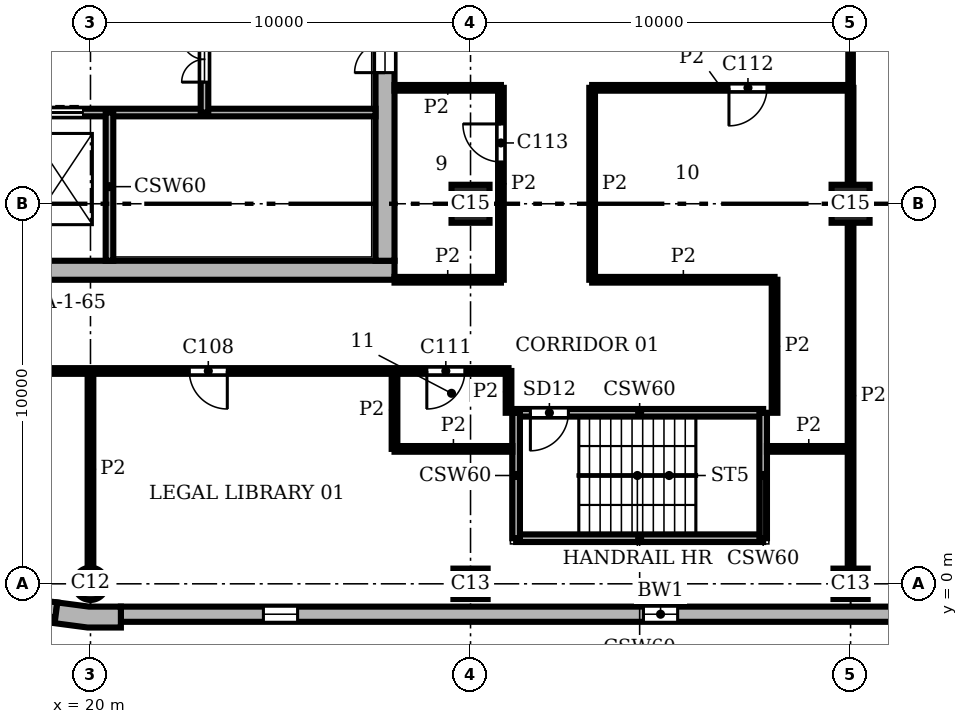
"""IFC4 building model, lengths in metres.
Left out: names, types, materials, properties, quantities, classifications, styles, units other than length and angle.
Written with IfcOpenShell. Run it as: python <this file> out.ifc"""

import sys

from ifc_helpers import new_model, si_unit, direction, frame, frame_2d, origin, origin_2d, place, context, subcontext, project, spatial, polyline, rectangle, circle, outline, extrude, element, fill, save


model = new_model("IFC4")
c1 = context("Model", 3, precision=1e-05, world=origin(), true_north=direction((0.0, 1.0)))
c2 = subcontext(c1, "Body", "Model", "MODEL_VIEW")
j1 = project(units=[si_unit("LENGTHUNIT", "METRE"), si_unit("PLANEANGLEUNIT", "RADIAN")], contexts=[c1])
p1 = place(None, origin())
s1 = spatial("IfcSite", under=j1, at=p1, CompositionType="ELEMENT")
p2 = place(p1, origin())
s2 = spatial("IfcBuilding", under=s1, at=p2, CompositionType="ELEMENT")
p3 = place(p2, frame((0.0, 0.0, 251.4)))
s3 = spatial("IfcBuildingStorey", under=s2, at=p3, CompositionType="ELEMENT", Elevation=251.4)
p4 = place(p3, frame((20.0, 0.0, 0.0), z_axis=(0.0, 0.0, 1.0), x_axis=(1.0, 0.0, 0.0)))
e1 = element("IfcColumn", 1, at=p4, inside=s3, PredefinedType="COLUMN", context=c2, shape_type="SweptSolid", body=[
    extrude(circle(Radius=0.425, at=origin_2d()), origin(), (0.0, 0.0, 1.0), 3.9),
])
for number, where, z_axis, x_axis in (
    (2, (30.0, 0.0, 0.0), (0.0, 0.0, 1.0), (1.0, 0.0, 0.0)),
    (3, (40.0, 0.0, 0.0), (0.0, 0.0, 1.0), (1.0, 0.0, 0.0)),
):
    element("IfcColumn", number, at=place(p3, frame(where, z_axis=z_axis, x_axis=x_axis)), inside=s3, PredefinedType="COLUMN", context=c2, shape_type="SweptSolid", body=[
        extrude(rectangle(XDim=0.9, YDim=0.8, at=origin_2d()), origin(), (0.0, 0.0, 1.0), 3.9),
    ])
for number, where, z_axis, x_axis in (
    (4, (30.0, 10.0, 0.0), (0.0, 0.0, 1.0), (1.0, 0.0, 0.0)),
    (5, (40.0, 10.0, 0.0), (0.0, 0.0, 1.0), (1.0, 0.0, 0.0)),
):
    element("IfcColumn", number, at=place(p3, frame(where, z_axis=z_axis, x_axis=x_axis)), inside=s3, PredefinedType="COLUMN", context=c2, shape_type="SweptSolid", body=[
        extrude(rectangle(XDim=1.0, YDim=1.0, at=origin_2d()), origin(), (0.0, 0.0, 1.0), 3.9),
    ])
p5 = place(p3, frame((8.0, 8.25, 0.0), z_axis=(0.0, 0.0, 1.0), x_axis=(1.0, 0.0, 0.0)))
e6 = element("IfcWall", 6, at=p5, inside=s3, PredefinedType="SHEAR", context=c2, shape_type="SweptSolid", body=[
    extrude(rectangle(XDim=20.0, YDim=0.5, at=frame_2d((10.0, 0.0))), origin(), (0.0, 0.0, 1.0), 3.9),
])
p6 = place(p3, frame((27.75, 8.5, 0.0), z_axis=(0.0, 0.0, 1.0), x_axis=(0.0, 1.0, 0.0)))
e7 = element("IfcWall", 7, at=p6, inside=s3, PredefinedType="SHEAR", context=c2, shape_type="SweptSolid", body=[
    extrude(rectangle(XDim=19.0, YDim=0.5, at=frame_2d((9.5, 0.0))), origin(), (0.0, 0.0, 1.0), 3.9),
])
p7 = place(p6, frame((4.95, 0.0, 0.0)))
e8 = element("IfcOpeningElement", 8, at=p7, cuts=e7, PredefinedType="OPENING", context=c2, shape_type="SweptSolid", body=[
    extrude(rectangle(XDim=1.6, YDim=2.1, at=frame_2d((0.8, 1.05))), frame((0.0, 0.26, 0.0), z_axis=(0.0, -1.0, 0.0), x_axis=(1.0, 0.0, 0.0)), (0.0, 0.0, 1.0), 0.52),
])
p8 = place(p3, origin())
e9 = element("IfcWall", 9, at=p8, inside=s3, PredefinedType="SOLIDWALL", context=c2, shape_type="SweptSolid", body=[
    extrude(outline(polyline([(19.076, -0.887), (19.057, -1.036), (19.925, -1.15), (20.8, -1.15), (20.8, -1.0), (20.8, -0.6), (19.961, -0.6), (19.128, -0.49), (19.076, -0.887)])), origin(), (0.0, 0.0, 1.0), 3.9),
])
p9 = place(p3, frame((20.8, -0.8, 0.0), z_axis=(0.0, 0.0, 1.0), x_axis=(1.0, 0.0, 0.0)))
e10 = element("IfcWall", 10, at=p9, inside=s3, PredefinedType="SOLIDWALL", context=c2, shape_type="SweptSolid", body=[
    extrude(rectangle(XDim=28.4, YDim=0.4, at=frame_2d((14.2, 0.0))), origin(), (0.0, 0.0, 1.0), 3.9),
])
p10 = place(p9, frame((3.75, 0.0, 0.9)))
e11 = element("IfcOpeningElement", 11, at=p10, cuts=e10, PredefinedType="OPENING", context=c2, shape_type="SweptSolid", body=[
    extrude(rectangle(XDim=0.9, YDim=2.35, at=frame_2d((0.45, 1.175))), frame((0.0, 0.21, 0.0), z_axis=(0.0, -1.0, 0.0), x_axis=(1.0, 0.0, 0.0)), (0.0, 0.0, 1.0), 0.42),
])
p11 = place(p9, frame((13.75, 0.0, 0.9)))
e12 = element("IfcOpeningElement", 12, at=p11, cuts=e10, PredefinedType="OPENING", context=c2, shape_type="SweptSolid", body=[
    extrude(rectangle(XDim=0.9, YDim=2.35, at=frame_2d((0.45, 1.175))), frame((0.0, 0.21, 0.0), z_axis=(0.0, -1.0, 0.0), x_axis=(1.0, 0.0, 0.0)), (0.0, 0.0, 1.0), 0.42),
])
p12 = place(p9, frame((23.75, 0.0, 0.9)))
e13 = element("IfcOpeningElement", 13, at=p12, cuts=e10, PredefinedType="OPENING", context=c2, shape_type="SweptSolid", body=[
    extrude(rectangle(XDim=0.9, YDim=2.35, at=frame_2d((0.45, 1.175))), frame((0.0, 0.21, 0.0), z_axis=(0.0, -1.0, 0.0), x_axis=(1.0, 0.0, 0.0)), (0.0, 0.0, 1.0), 0.42),
])
p13 = place(p3, frame((15.017, -0.151, 0.0), z_axis=(0.0, 0.0, 1.0), x_axis=(0.991446429508, -0.130514280502, 0.0)))
e14 = element("IfcWall", 14, at=p13, inside=s3, PredefinedType="SOLIDWALL", context=c2, shape_type="SweptSolid", body=[
    extrude(rectangle(XDim=4.121, YDim=0.4, at=frame_2d((2.061, 0.0))), origin(), (0.0, 0.0, 1.0), 3.9),
])
p14 = place(p13, frame((1.611, 0.0, 0.9)))
e15 = element("IfcOpeningElement", 15, at=p14, cuts=e14, PredefinedType="OPENING", context=c2, shape_type="SweptSolid", body=[
    extrude(rectangle(XDim=0.9, YDim=2.35, at=frame_2d((0.45, 1.175))), frame((0.0, 0.21, 0.0), z_axis=(0.0, -1.0, 0.0), x_axis=(1.0, 0.0, 0.0)), (0.0, 0.0, 1.0), 0.42),
])
p15 = place(p3, frame((31.2, 1.2, 0.0), z_axis=(0.0, 0.0, 1.0), x_axis=(1.0, 0.0, 0.0)))
e16 = element("IfcWall", 16, at=p15, inside=s3, PredefinedType="SHEAR", context=c2, shape_type="SweptSolid", body=[
    extrude(rectangle(XDim=6.5, YDim=0.2, at=frame_2d((3.25, 0.0))), origin(), (0.0, 0.0, 1.0), 3.58),
])
p16 = place(p3, frame((31.2, 4.5, 0.0), z_axis=(0.0, 0.0, 1.0), x_axis=(1.0, 0.0, 0.0)))
e17 = element("IfcWall", 17, at=p16, inside=s3, PredefinedType="SHEAR", context=c2, shape_type="SweptSolid", body=[
    extrude(rectangle(XDim=6.5, YDim=0.2, at=frame_2d((3.25, 0.0))), origin(), (0.0, 0.0, 1.0), 3.58),
])
p17 = place(p16, frame((0.375, 0.0, 0.0)))
e18 = element("IfcOpeningElement", 18, at=p17, cuts=e17, PredefinedType="OPENING", context=c2, shape_type="SweptSolid", body=[
    extrude(rectangle(XDim=1.0, YDim=2.1, at=frame_2d((0.5, 1.05))), frame((0.0, 0.11, 0.0), z_axis=(0.0, -1.0, 0.0), x_axis=(1.0, 0.0, 0.0)), (0.0, 0.0, 1.0), 0.22),
])
p18 = place(p3, frame((13.8, 12.4, 0.0), z_axis=(0.0, 0.0, 1.0), x_axis=(1.0, 0.0, 0.0)))
e19 = element("IfcWall", 19, at=p18, inside=s3, PredefinedType="SHEAR", context=c2, shape_type="SweptSolid", body=[
    extrude(rectangle(XDim=13.7, YDim=0.2, at=frame_2d((6.85, 0.0))), origin(), (0.0, 0.0, 1.0), 3.58),
])
p19 = place(p18, frame((2.4, 0.0, 0.0)))
e20 = element("IfcOpeningElement", 20, at=p19, cuts=e19, PredefinedType="OPENING", context=c2, shape_type="SweptSolid", body=[
    extrude(rectangle(XDim=1.1, YDim=2.1, at=frame_2d((0.55, 1.05))), frame((0.0, 0.11, 0.0), z_axis=(0.0, -1.0, 0.0), x_axis=(1.0, 0.0, 0.0)), (0.0, 0.0, 1.0), 0.22),
])
p20 = place(p18, frame((4.9, 0.0, 0.0)))
e21 = element("IfcOpeningElement", 21, at=p20, cuts=e19, PredefinedType="OPENING", context=c2, shape_type="SweptSolid", body=[
    extrude(rectangle(XDim=1.1, YDim=2.1, at=frame_2d((0.55, 1.05))), frame((0.0, 0.11, 0.0), z_axis=(0.0, -1.0, 0.0), x_axis=(1.0, 0.0, 0.0)), (0.0, 0.0, 1.0), 0.22),
])
p21 = place(p18, frame((0.15, 0.0, 0.0)))
e22 = element("IfcOpeningElement", 22, at=p21, cuts=e19, PredefinedType="OPENING", context=c2, shape_type="SweptSolid", body=[
    extrude(rectangle(XDim=1.0, YDim=2.1, at=frame_2d((0.5, 1.05))), frame((0.0, 0.11, 0.0), z_axis=(0.0, -1.0, 0.0), x_axis=(1.0, 0.0, 0.0)), (0.0, 0.0, 1.0), 0.22),
])
p22 = place(p3, frame((20.5, 8.5, 0.0), z_axis=(0.0, 0.0, 1.0), x_axis=(0.0, 1.0, 0.0)))
e23 = element("IfcWall", 23, at=p22, inside=s3, PredefinedType="SHEAR", context=c2, shape_type="SweptSolid", body=[
    extrude(rectangle(XDim=3.9, YDim=0.2, at=frame_2d((1.95, 0.0))), origin(), (0.0, 0.0, 1.0), 3.58),
])
p23 = place(p3, frame((23.0, 12.4, 0.0), z_axis=(0.0, 0.0, 1.0), x_axis=(0.0, 1.0, 0.0)))
e24 = element("IfcWall", 24, at=p23, inside=s3, PredefinedType="SHEAR", context=c2, shape_type="SweptSolid", body=[
    extrude(rectangle(XDim=2.8, YDim=0.2, at=frame_2d((1.4, 0.0))), origin(), (0.0, 0.0, 1.0), 3.58),
])
p24 = place(p23, frame((0.8, 0.0, 0.0)))
e25 = element("IfcOpeningElement", 25, at=p24, cuts=e24, PredefinedType="OPENING", context=c2, shape_type="SweptSolid", body=[
    extrude(rectangle(XDim=1.2, YDim=2.1, at=frame_2d((0.6, 1.05))), frame((0.0, 0.11, 0.0), z_axis=(0.0, -1.0, 0.0), x_axis=(1.0, 0.0, 0.0)), (0.0, 0.0, 1.0), 0.22),
])
for number, where, z_axis, x_axis in (
    (26, (31.2, 1.2, 0.0), (0.0, 0.0, 1.0), (0.0, 1.0, 0.0)),
    (27, (37.7, 1.2, 0.0), (0.0, 0.0, 1.0), (0.0, 1.0, 0.0)),
):
    element("IfcWall", number, at=place(p3, frame(where, z_axis=z_axis, x_axis=x_axis)), inside=s3, PredefinedType="SHEAR", context=c2, shape_type="SweptSolid", body=[
        extrude(rectangle(XDim=3.3, YDim=0.2, at=frame_2d((1.65, 0.0))), origin(), (0.0, 0.0, 1.0), 3.58),
    ])
p25 = place(p3, frame((20.0, 0.425, 0.0), z_axis=(0.0, 0.0, 1.0), x_axis=(0.0, 1.0, 0.0)))
e28 = element("IfcWall", 28, at=p25, inside=s3, PredefinedType="PARTITIONING", context=c2, shape_type="SweptSolid", body=[
    extrude(rectangle(XDim=5.175, YDim=0.15, at=frame_2d((2.587, 0.0))), origin(), (0.0, 0.0, 1.0), 3.58),
])
p26 = place(p3, frame((28.0, 3.55, 0.0), z_axis=(0.0, 0.0, 1.0), x_axis=(0.0, 1.0, 0.0)))
e29 = element("IfcWall", 29, at=p26, inside=s3, PredefinedType="PARTITIONING", context=c2, shape_type="SweptSolid", body=[
    extrude(rectangle(XDim=2.05, YDim=0.15, at=frame_2d((1.025, 0.0))), origin(), (0.0, 0.0, 1.0), 3.58),
])
p27 = place(p3, frame((30.8, 8.0, 0.0), z_axis=(0.0, 0.0, 1.0), x_axis=(0.0, 1.0, 0.0)))
e30 = element("IfcWall", 30, at=p27, inside=s3, PredefinedType="PARTITIONING", context=c2, shape_type="SweptSolid", body=[
    extrude(rectangle(XDim=5.05, YDim=0.15, at=frame_2d((2.525, 0.0))), origin(), (0.0, 0.0, 1.0), 3.58),
])
p28 = place(p27, frame((3.1, 0.0, 0.0)))
e31 = element("IfcOpeningElement", 31, at=p28, cuts=e30, PredefinedType="OPENING", context=c2, shape_type="SweptSolid", body=[
    extrude(rectangle(XDim=1.0, YDim=2.1, at=frame_2d((0.5, 1.05))), frame((0.0, 0.085, 0.0), z_axis=(0.0, -1.0, 0.0), x_axis=(1.0, 0.0, 0.0)), (0.0, 0.0, 1.0), 0.17),
])
p29 = place(p3, frame((31.0, 4.5, 0.0), z_axis=(0.0, 0.0, 1.0), x_axis=(0.0, 1.0, 0.0)))
e32 = element("IfcWall", 32, at=p29, inside=s3, PredefinedType="PARTITIONING", context=c2, shape_type="SweptSolid", body=[
    extrude(rectangle(XDim=1.1, YDim=0.15, at=frame_2d((0.55, 0.0))), origin(), (0.0, 0.0, 1.0), 3.58),
])
p30 = place(p3, frame((33.2, 8.0, 0.0), z_axis=(0.0, 0.0, 1.0), x_axis=(0.0, 1.0, 0.0)))
e33 = element("IfcWall", 33, at=p30, inside=s3, PredefinedType="PARTITIONING", context=c2, shape_type="SweptSolid", body=[
    extrude(rectangle(XDim=5.05, YDim=0.15, at=frame_2d((2.525, 0.0))), origin(), (0.0, 0.0, 1.0), 3.58),
])
p31 = place(p3, frame((38.0, 4.5, 0.0), z_axis=(0.0, 0.0, 1.0), x_axis=(0.0, 1.0, 0.0)))
e34 = element("IfcWall", 34, at=p31, inside=s3, PredefinedType="PARTITIONING", context=c2, shape_type="SweptSolid", body=[
    extrude(rectangle(XDim=3.5, YDim=0.15, at=frame_2d((1.75, 0.0))), origin(), (0.0, 0.0, 1.0), 3.58),
])
p32 = place(p3, frame((40.0, 0.4, 0.0), z_axis=(0.0, 0.0, 1.0), x_axis=(0.0, 1.0, 0.0)))
e35 = element("IfcWall", 35, at=p32, inside=s3, PredefinedType="PARTITIONING", context=c2, shape_type="SweptSolid", body=[
    extrude(rectangle(XDim=9.1, YDim=0.15, at=frame_2d((4.55, 0.0))), origin(), (0.0, 0.0, 1.0), 3.58),
])
p33 = place(p3, frame((40.0, 10.5, 0.0), z_axis=(0.0, 0.0, 1.0), x_axis=(0.0, 1.0, 0.0)))
e36 = element("IfcWall", 36, at=p33, inside=s3, PredefinedType="PARTITIONING", context=c2, shape_type="SweptSolid", body=[
    extrude(rectangle(XDim=2.55, YDim=0.15, at=frame_2d((1.275, 0.0))), origin(), (0.0, 0.0, 1.0), 3.58),
])
p34 = place(p3, frame((28.0, 3.55, 0.0), z_axis=(0.0, 0.0, 1.0), x_axis=(1.0, 0.0, 0.0)))
e37 = element("IfcWall", 37, at=p34, inside=s3, PredefinedType="PARTITIONING", context=c2, shape_type="SweptSolid", body=[
    extrude(rectangle(XDim=3.1, YDim=0.15, at=frame_2d((1.55, 0.0))), origin(), (0.0, 0.0, 1.0), 3.58),
])
p35 = place(p3, frame((37.8, 3.55, 0.0), z_axis=(0.0, 0.0, 1.0), x_axis=(1.0, 0.0, 0.0)))
e38 = element("IfcWall", 38, at=p35, inside=s3, PredefinedType="PARTITIONING", context=c2, shape_type="SweptSolid", body=[
    extrude(rectangle(XDim=2.2, YDim=0.15, at=frame_2d((1.1, 0.0))), origin(), (0.0, 0.0, 1.0), 3.58),
])
p36 = place(p3, frame((5.6, 5.6, 0.0), z_axis=(0.0, 0.0, 1.0), x_axis=(1.0, 0.0, 0.0)))
e39 = element("IfcWall", 39, at=p36, inside=s3, PredefinedType="PARTITIONING", context=c2, shape_type="SweptSolid", body=[
    extrude(rectangle(XDim=25.4, YDim=0.15, at=frame_2d((12.7, 0.0))), origin(), (0.0, 0.0, 1.0), 3.58),
])
p37 = place(p36, frame((4.6, 0.0, 0.0)))
e40 = element("IfcOpeningElement", 40, at=p37, cuts=e39, PredefinedType="OPENING", context=c2, shape_type="SweptSolid", body=[
    extrude(rectangle(XDim=1.0, YDim=2.1, at=frame_2d((0.5, 1.05))), frame((0.0, 0.085, 0.0), z_axis=(0.0, -1.0, 0.0), x_axis=(1.0, 0.0, 0.0)), (0.0, 0.0, 1.0), 0.17),
])
p38 = place(p36, frame((11.0, 0.0, 0.0)))
e41 = element("IfcOpeningElement", 41, at=p38, cuts=e39, PredefinedType="OPENING", context=c2, shape_type="SweptSolid", body=[
    extrude(rectangle(XDim=0.8, YDim=2.1, at=frame_2d((0.4, 1.05))), frame((0.0, 0.085, 0.0), z_axis=(0.0, -1.0, 0.0), x_axis=(1.0, 0.0, 0.0)), (0.0, 0.0, 1.0), 0.17),
])
p39 = place(p36, frame((17.0, 0.0, 0.0)))
e42 = element("IfcOpeningElement", 42, at=p39, cuts=e39, PredefinedType="OPENING", context=c2, shape_type="SweptSolid", body=[
    extrude(rectangle(XDim=1.0, YDim=2.1, at=frame_2d((0.5, 1.05))), frame((0.0, 0.085, 0.0), z_axis=(0.0, -1.0, 0.0), x_axis=(1.0, 0.0, 0.0)), (0.0, 0.0, 1.0), 0.17),
])
p40 = place(p36, frame((23.25, 0.0, 0.0)))
e43 = element("IfcOpeningElement", 43, at=p40, cuts=e39, PredefinedType="OPENING", context=c2, shape_type="SweptSolid", body=[
    extrude(rectangle(XDim=1.0, YDim=2.1, at=frame_2d((0.5, 1.05))), frame((0.0, 0.085, 0.0), z_axis=(0.0, -1.0, 0.0), x_axis=(1.0, 0.0, 0.0)), (0.0, 0.0, 1.0), 0.17),
])
p41 = place(p3, frame((28.0, 8.0, 0.0), z_axis=(0.0, 0.0, 1.0), x_axis=(1.0, 0.0, 0.0)))
e44 = element("IfcWall", 44, at=p41, inside=s3, PredefinedType="PARTITIONING", context=c2, shape_type="SweptSolid", body=[
    extrude(rectangle(XDim=2.8, YDim=0.15, at=frame_2d((1.4, 0.0))), origin(), (0.0, 0.0, 1.0), 3.58),
])
p42 = place(p3, frame((33.2, 8.0, 0.0), z_axis=(0.0, 0.0, 1.0), x_axis=(1.0, 0.0, 0.0)))
e45 = element("IfcWall", 45, at=p42, inside=s3, PredefinedType="PARTITIONING", context=c2, shape_type="SweptSolid", body=[
    extrude(rectangle(XDim=4.8, YDim=0.15, at=frame_2d((2.4, 0.0))), origin(), (0.0, 0.0, 1.0), 3.58),
])
p43 = place(p3, frame((28.0, 13.05, 0.0), z_axis=(0.0, 0.0, 1.0), x_axis=(1.0, 0.0, 0.0)))
e46 = element("IfcWall", 46, at=p43, inside=s3, PredefinedType="PARTITIONING", context=c2, shape_type="SweptSolid", body=[
    extrude(rectangle(XDim=2.8, YDim=0.15, at=frame_2d((1.4, 0.0))), origin(), (0.0, 0.0, 1.0), 3.58),
])
p44 = place(p3, frame((33.2, 13.05, 0.0), z_axis=(0.0, 0.0, 1.0), x_axis=(1.0, 0.0, 0.0)))
e47 = element("IfcWall", 47, at=p44, inside=s3, PredefinedType="PARTITIONING", context=c2, shape_type="SweptSolid", body=[
    extrude(rectangle(XDim=6.8, YDim=0.15, at=frame_2d((3.4, 0.0))), origin(), (0.0, 0.0, 1.0), 3.58),
])
p45 = place(p44, frame((3.6, 0.0, 0.0)))
e48 = element("IfcOpeningElement", 48, at=p45, cuts=e47, PredefinedType="OPENING", context=c2, shape_type="SweptSolid", body=[
    extrude(rectangle(XDim=1.0, YDim=2.1, at=frame_2d((0.5, 1.05))), frame((0.0, 0.085, 0.0), z_axis=(0.0, -1.0, 0.0), x_axis=(1.0, 0.0, 0.0)), (0.0, 0.0, 1.0), 0.17),
])
p46 = place(p3, frame((40.0, 13.05, 0.0), z_axis=(0.0, 0.0, 1.0), x_axis=(0.0, 1.0, 0.0)))
e49 = element("IfcWall", 49, at=p46, inside=s3, PredefinedType="PARTITIONING", context=c2, shape_type="SweptSolid", body=[
    extrude(rectangle(XDim=2.4, YDim=0.12, at=frame_2d((1.2, 0.0))), origin(), (0.0, 0.0, 1.0), 3.58),
])
p47 = place(p10, origin())
e50 = element("IfcWindow", 50, at=p47, inside=s3, PartitioningType="SINGLE_PANEL", PredefinedType="WINDOW", context=c2, shape_type="SweptSolid", body=[
    extrude(rectangle(XDim=0.9, YDim=2.35, at=frame_2d((0.45, 1.175))), frame((0.0, 0.16, 0.0), z_axis=(0.0, -1.0, 0.0), x_axis=(1.0, 0.0, 0.0)), (0.0, 0.0, 1.0), 0.06),
])
fill(e11, e50)
p48 = place(p11, origin())
e51 = element("IfcWindow", 51, at=p48, inside=s3, PartitioningType="SINGLE_PANEL", PredefinedType="WINDOW", context=c2, shape_type="SweptSolid", body=[
    extrude(rectangle(XDim=0.9, YDim=2.35, at=frame_2d((0.45, 1.175))), frame((0.0, 0.16, 0.0), z_axis=(0.0, -1.0, 0.0), x_axis=(1.0, 0.0, 0.0)), (0.0, 0.0, 1.0), 0.06),
])
fill(e12, e51)
p49 = place(p20, origin())
e52 = element("IfcDoor", 52, at=p49, inside=s3, OperationType="DOUBLE_DOOR_SLIDING", PredefinedType="DOOR", context=c2, shape_type="SweptSolid", body=[
    extrude(rectangle(XDim=1.1, YDim=2.1, at=frame_2d((0.55, 1.05))), frame((0.0, 0.025, 0.0), z_axis=(0.0, -1.0, 0.0), x_axis=(1.0, 0.0, 0.0)), (0.0, 0.0, 1.0), 0.05),
])
fill(e21, e52)
p50 = place(p17, frame((1.0, 0.0, 0.0), z_axis=(0.0, 0.0, 1.0), x_axis=(-1.0, 0.0, 0.0)))
e53 = element("IfcDoor", 53, at=p50, inside=s3, OperationType="SINGLE_SWING_RIGHT", PredefinedType="DOOR", context=c2, shape_type="SweptSolid", body=[
    extrude(rectangle(XDim=1.0, YDim=2.1, at=frame_2d((0.5, 1.05))), frame((0.0, 0.025, 0.0), z_axis=(0.0, -1.0, 0.0), x_axis=(1.0, 0.0, 0.0)), (0.0, 0.0, 1.0), 0.05),
])
fill(e18, e53)
p51 = place(p24, origin())
e54 = element("IfcDoor", 54, at=p51, inside=s3, OperationType="DOUBLE_DOOR_SINGLE_SWING", PredefinedType="DOOR", context=c2, shape_type="SweptSolid", body=[
    extrude(rectangle(XDim=1.2, YDim=2.1, at=frame_2d((0.6, 1.05))), frame((0.0, 0.025, 0.0), z_axis=(0.0, -1.0, 0.0), x_axis=(1.0, 0.0, 0.0)), (0.0, 0.0, 1.0), 0.05),
])
fill(e25, e54)
p52 = place(p7, origin())
e55 = element("IfcDoor", 55, at=p52, inside=s3, OperationType="DOUBLE_DOOR_SINGLE_SWING", PredefinedType="DOOR", context=c2, shape_type="SweptSolid", body=[
    extrude(rectangle(XDim=1.6, YDim=2.1, at=frame_2d((0.8, 1.05))), frame((0.0, 0.025, 0.0), z_axis=(0.0, -1.0, 0.0), x_axis=(1.0, 0.0, 0.0)), (0.0, 0.0, 1.0), 0.05),
])
fill(e8, e55)
p53 = place(p39, frame((1.0, 0.0, 0.0), z_axis=(0.0, 0.0, 1.0), x_axis=(-1.0, 0.0, 0.0)))
e56 = element("IfcDoor", 56, at=p53, inside=s3, OperationType="SINGLE_SWING_LEFT", PredefinedType="DOOR", context=c2, shape_type="SweptSolid", body=[
    extrude(rectangle(XDim=1.0, YDim=2.1, at=frame_2d((0.5, 1.05))), frame((0.0, 0.025, 0.0), z_axis=(0.0, -1.0, 0.0), x_axis=(1.0, 0.0, 0.0)), (0.0, 0.0, 1.0), 0.05),
])
fill(e42, e56)
p54 = place(p40, frame((1.0, 0.0, 0.0), z_axis=(0.0, 0.0, 1.0), x_axis=(-1.0, 0.0, 0.0)))
e57 = element("IfcDoor", 57, at=p54, inside=s3, OperationType="SINGLE_SWING_RIGHT", PredefinedType="DOOR", context=c2, shape_type="SweptSolid", body=[
    extrude(rectangle(XDim=1.0, YDim=2.1, at=frame_2d((0.5, 1.05))), frame((0.0, 0.025, 0.0), z_axis=(0.0, -1.0, 0.0), x_axis=(1.0, 0.0, 0.0)), (0.0, 0.0, 1.0), 0.05),
])
fill(e43, e57)
p55 = place(p45, frame((1.0, 0.0, 0.0), z_axis=(0.0, 0.0, 1.0), x_axis=(-1.0, 0.0, 0.0)))
e58 = element("IfcDoor", 58, at=p55, inside=s3, OperationType="SINGLE_SWING_RIGHT", PredefinedType="DOOR", context=c2, shape_type="SweptSolid", body=[
    extrude(rectangle(XDim=1.0, YDim=2.1, at=frame_2d((0.5, 1.05))), frame((0.0, 0.025, 0.0), z_axis=(0.0, -1.0, 0.0), x_axis=(1.0, 0.0, 0.0)), (0.0, 0.0, 1.0), 0.05),
])
fill(e48, e58)
p56 = place(p28, origin())
e59 = element("IfcDoor", 59, at=p56, inside=s3, OperationType="SINGLE_SWING_RIGHT", PredefinedType="DOOR", context=c2, shape_type="SweptSolid", body=[
    extrude(rectangle(XDim=1.0, YDim=2.1, at=frame_2d((0.5, 1.05))), frame((0.0, 0.025, 0.0), z_axis=(0.0, -1.0, 0.0), x_axis=(1.0, 0.0, 0.0)), (0.0, 0.0, 1.0), 0.05),
])
fill(e31, e59)
save(model, sys.argv[1])
